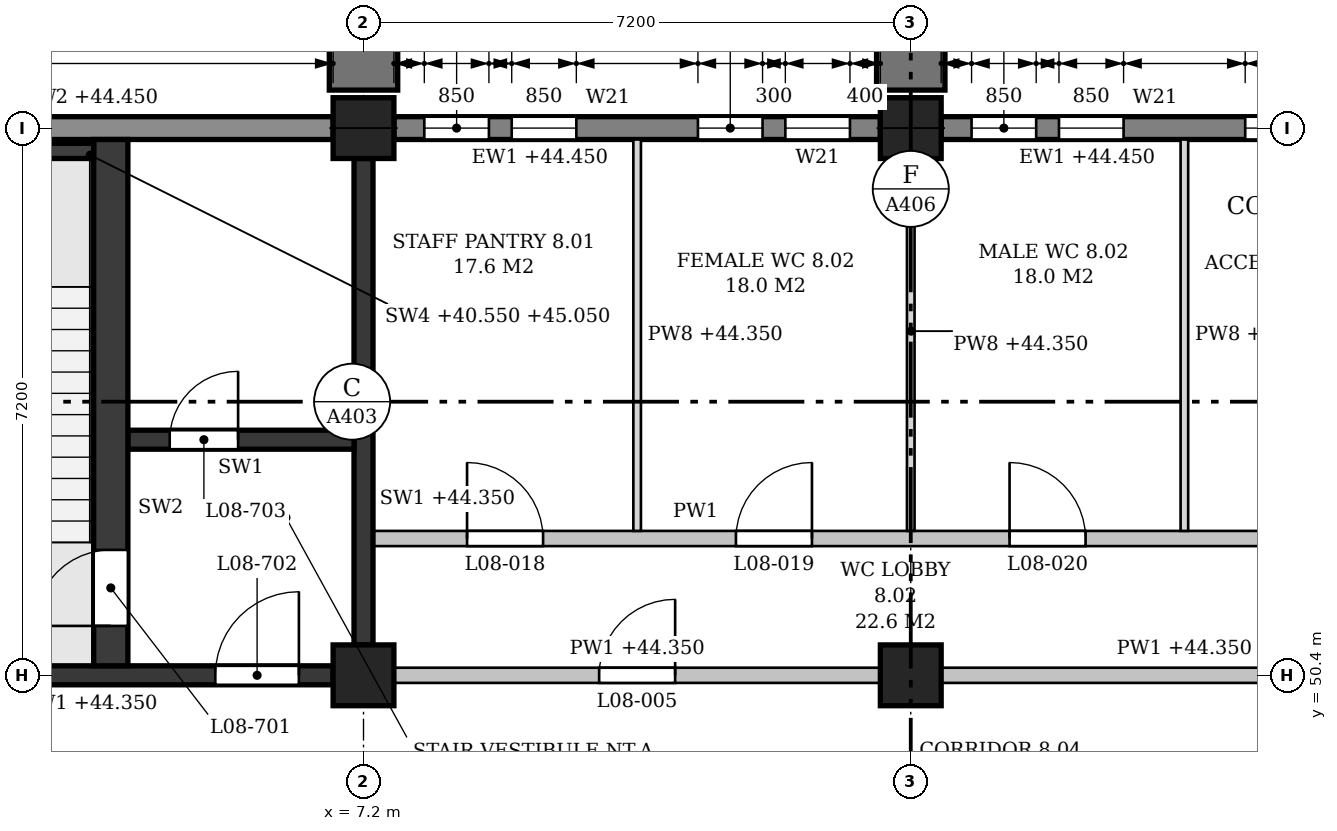
"""IFC4 building model, lengths in metres.
Left out: names, types, materials, properties, quantities, classifications, styles, units other than length and angle.
Written with IfcOpenShell. Run it as: python <this file> out.ifc"""

import sys

from ifc_helpers import new_model, si_unit, direction, frame, frame_2d, origin, origin_2d, place, context, subcontext, project, spatial, polyline, rectangle, outline, extrude, element, fill, save


model = new_model("IFC4")
c1 = context("Model", 3, precision=1e-05, world=origin(), true_north=direction((0.0, 1.0)))
c2 = subcontext(c1, "Body", "Model", "MODEL_VIEW")
j1 = project(units=[si_unit("LENGTHUNIT", "METRE"), si_unit("PLANEANGLEUNIT", "RADIAN")], contexts=[c1])
p1 = place(None, origin())
s1 = spatial("IfcSite", under=j1, at=p1, CompositionType="ELEMENT")
p2 = place(p1, origin())
s2 = spatial("IfcBuilding", under=s1, at=p2, CompositionType="ELEMENT")
p3 = place(p2, frame((0.0, 0.0, 40.8)))
s3 = spatial("IfcBuildingStorey", under=s2, at=p3, CompositionType="ELEMENT", Elevation=40.8)
for number, where, z_axis, x_axis in (
    (1, (7.2, 50.4, 0.0), (0.0, 0.0, 1.0), (1.0, 0.0, 0.0)),
    (2, (7.2, 57.6, 0.0), (0.0, 0.0, 1.0), (1.0, 0.0, 0.0)),
    (3, (14.4, 50.4, 0.0), (0.0, 0.0, 1.0), (1.0, 0.0, 0.0)),
    (4, (14.4, 57.6, 0.0), (0.0, 0.0, 1.0), (1.0, 0.0, 0.0)),
):
    element("IfcColumn", number, at=place(p3, frame(where, z_axis=z_axis, x_axis=x_axis)), inside=s3, PredefinedType="COLUMN", context=c2, shape_type="SweptSolid", body=[
        extrude(rectangle(XDim=0.8, YDim=0.8, at=origin_2d()), origin(), (0.0, 0.0, 1.0), 4.5),
    ])
p4 = place(p3, frame((21.2, 57.6, 0.0), z_axis=(0.0, 0.0, 1.0), x_axis=(-1.0, 0.0, 0.0)))
e5 = element("IfcWall", 5, at=p4, inside=s3, PredefinedType="STANDARD", context=c2, shape_type="SweptSolid", body=[
    extrude(rectangle(XDim=6.4, YDim=0.3, at=frame_2d((3.2, 0.0))), origin(), (0.0, 0.0, 1.0), 3.65),
])
p5 = place(p4, frame((0.4, 0.0, 0.9)))
e6 = element("IfcOpeningElement", 6, at=p5, cuts=e5, PredefinedType="OPENING", context=c2, shape_type="SweptSolid", body=[
    extrude(outline(polyline([(0.0, 0.0), (0.85, 0.0), (0.85, 2.25), (0.425, 2.7), (0.0, 2.25), (0.0, 0.0)])), frame((0.0, 0.16, 0.0), z_axis=(0.0, -1.0, 0.0), x_axis=(1.0, 0.0, 0.0)), (0.0, 0.0, 1.0), 0.32),
])
p6 = place(p4, frame((1.55, 0.0, 0.9)))
e7 = element("IfcOpeningElement", 7, at=p6, cuts=e5, PredefinedType="OPENING", context=c2, shape_type="SweptSolid", body=[
    extrude(outline(polyline([(0.0, 0.0), (0.85, 0.0), (0.85, 2.25), (0.425, 2.7), (0.0, 2.25), (0.0, 0.0)])), frame((0.0, 0.16, 0.0), z_axis=(0.0, -1.0, 0.0), x_axis=(1.0, 0.0, 0.0)), (0.0, 0.0, 1.0), 0.32),
])
p7 = place(p4, frame((4.0, 0.0, 0.9)))
e8 = element("IfcOpeningElement", 8, at=p7, cuts=e5, PredefinedType="OPENING", context=c2, shape_type="SweptSolid", body=[
    extrude(outline(polyline([(0.0, 0.0), (0.85, 0.0), (0.85, 2.25), (0.425, 2.7), (0.0, 2.25), (0.0, 0.0)])), frame((0.0, 0.16, 0.0), z_axis=(0.0, -1.0, 0.0), x_axis=(1.0, 0.0, 0.0)), (0.0, 0.0, 1.0), 0.32),
])
p8 = place(p4, frame((5.15, 0.0, 0.9)))
e9 = element("IfcOpeningElement", 9, at=p8, cuts=e5, PredefinedType="OPENING", context=c2, shape_type="SweptSolid", body=[
    extrude(outline(polyline([(0.0, 0.0), (0.85, 0.0), (0.85, 2.25), (0.425, 2.7), (0.0, 2.25), (0.0, 0.0)])), frame((0.0, 0.16, 0.0), z_axis=(0.0, -1.0, 0.0), x_axis=(1.0, 0.0, 0.0)), (0.0, 0.0, 1.0), 0.32),
])
p9 = place(p3, frame((14.0, 57.6, 0.0), z_axis=(0.0, 0.0, 1.0), x_axis=(-1.0, 0.0, 0.0)))
e10 = element("IfcWall", 10, at=p9, inside=s3, PredefinedType="STANDARD", context=c2, shape_type="SweptSolid", body=[
    extrude(rectangle(XDim=6.4, YDim=0.3, at=frame_2d((3.2, 0.0))), origin(), (0.0, 0.0, 1.0), 3.65),
])
p10 = place(p9, frame((0.4, 0.0, 0.9)))
e11 = element("IfcOpeningElement", 11, at=p10, cuts=e10, PredefinedType="OPENING", context=c2, shape_type="SweptSolid", body=[
    extrude(outline(polyline([(0.0, 0.0), (0.85, 0.0), (0.85, 2.25), (0.425, 2.7), (0.0, 2.25), (0.0, 0.0)])), frame((0.0, 0.16, 0.0), z_axis=(0.0, -1.0, 0.0), x_axis=(1.0, 0.0, 0.0)), (0.0, 0.0, 1.0), 0.32),
])
p11 = place(p9, frame((1.55, 0.0, 0.9)))
e12 = element("IfcOpeningElement", 12, at=p11, cuts=e10, PredefinedType="OPENING", context=c2, shape_type="SweptSolid", body=[
    extrude(outline(polyline([(0.0, 0.0), (0.85, 0.0), (0.85, 2.25), (0.425, 2.7), (0.0, 2.25), (0.0, 0.0)])), frame((0.0, 0.16, 0.0), z_axis=(0.0, -1.0, 0.0), x_axis=(1.0, 0.0, 0.0)), (0.0, 0.0, 1.0), 0.32),
])
p12 = place(p9, frame((4.0, 0.0, 0.9)))
e13 = element("IfcOpeningElement", 13, at=p12, cuts=e10, PredefinedType="OPENING", context=c2, shape_type="SweptSolid", body=[
    extrude(outline(polyline([(0.0, 0.0), (0.85, 0.0), (0.85, 2.25), (0.425, 2.7), (0.0, 2.25), (0.0, 0.0)])), frame((0.0, 0.16, 0.0), z_axis=(0.0, -1.0, 0.0), x_axis=(1.0, 0.0, 0.0)), (0.0, 0.0, 1.0), 0.32),
])
p13 = place(p9, frame((5.15, 0.0, 0.9)))
e14 = element("IfcOpeningElement", 14, at=p13, cuts=e10, PredefinedType="OPENING", context=c2, shape_type="SweptSolid", body=[
    extrude(outline(polyline([(0.0, 0.0), (0.85, 0.0), (0.85, 2.25), (0.425, 2.7), (0.0, 2.25), (0.0, 0.0)])), frame((0.0, 0.16, 0.0), z_axis=(0.0, -1.0, 0.0), x_axis=(1.0, 0.0, 0.0)), (0.0, 0.0, 1.0), 0.32),
])
p14 = place(p3, frame((6.8, 57.6, 0.0), z_axis=(0.0, 0.0, 1.0), x_axis=(-1.0, 0.0, 0.0)))
e15 = element("IfcWall", 15, at=p14, inside=s3, PredefinedType="STANDARD", context=c2, shape_type="SweptSolid", body=[
    extrude(rectangle(XDim=6.4, YDim=0.3, at=frame_2d((3.2, 0.0))), origin(), (0.0, 0.0, 1.0), 3.65),
])
p15 = place(p14, frame((4.55, 0.0, 0.9)))
e16 = element("IfcOpeningElement", 16, at=p15, cuts=e15, PredefinedType="OPENING", context=c2, shape_type="SweptSolid", body=[
    extrude(outline(polyline([(0.0, 0.0), (0.9, 0.0), (0.9, 2.25), (0.45, 2.7), (0.0, 2.25), (0.0, 0.0)])), frame((0.0, 0.16, 0.0), z_axis=(0.0, -1.0, 0.0), x_axis=(1.0, 0.0, 0.0)), (0.0, 0.0, 1.0), 0.32),
])
for number, where, z_axis, x_axis in (
    (17, (7.2, 58.1, -0.25), (0.0, 0.0, 1.0), (0.0, 1.0, 0.0)),
    (18, (14.4, 58.1, -0.25), (0.0, 0.0, 1.0), (0.0, 1.0, 0.0)),
):
    element("IfcWall", number, at=place(p3, frame(where, z_axis=z_axis, x_axis=x_axis)), inside=s3, PredefinedType="POLYGONAL", context=c2, shape_type="SweptSolid", body=[
        extrude(outline(polyline([(1.1, 0.0), (1.1, 12.325), (0.15, 13.75), (0.0, 13.75), (0.0, 0.0), (1.1, 0.0)])), frame((0.0, 0.45, 0.0), z_axis=(0.0, -1.0, 0.0), x_axis=(1.0, 0.0, 0.0)), (0.0, 0.0, 1.0), 0.9),
    ])
p16 = place(p3, frame((0.4, 50.4, 0.0), z_axis=(0.0, 0.0, 1.0), x_axis=(1.0, 0.0, 0.0)))
e19 = element("IfcWall", 19, at=p16, inside=s3, PredefinedType="SHEAR", context=c2, shape_type="SweptSolid", body=[
    extrude(rectangle(XDim=6.4, YDim=0.25, at=frame_2d((3.2, 0.0))), origin(), (0.0, 0.0, 1.0), 3.55),
])
p17 = place(p16, frame((4.85, 0.0, 0.0)))
e20 = element("IfcOpeningElement", 20, at=p17, cuts=e19, PredefinedType="OPENING", context=c2, shape_type="SweptSolid", body=[
    extrude(rectangle(XDim=1.1, YDim=2.1, at=frame_2d((0.55, 1.05))), frame((0.0, 0.135, 0.0), z_axis=(0.0, -1.0, 0.0), x_axis=(1.0, 0.0, 0.0)), (0.0, 0.0, 1.0), 0.27),
])
p18 = place(p3, frame((7.2, 50.8, 0.0), z_axis=(0.0, 0.0, 1.0), x_axis=(0.0, 1.0, 0.0)))
e21 = element("IfcWall", 21, at=p18, inside=s3, PredefinedType="SHEAR", context=c2, shape_type="SweptSolid", body=[
    extrude(rectangle(XDim=6.4, YDim=0.25, at=frame_2d((3.2, 0.0))), origin(), (0.0, 0.0, 1.0), 3.55),
])
p19 = place(p3, frame((2.25, 57.3, -0.25), z_axis=(0.0, 0.0, 1.0), x_axis=(1.0, 0.0, 0.0)))
e22 = element("IfcWall", 22, at=p19, inside=s3, PredefinedType="SHEAR", context=c2, shape_type="SweptSolid", body=[
    extrude(rectangle(XDim=1.4, YDim=0.2, at=frame_2d((0.7, 0.0))), origin(), (0.0, 0.0, 1.0), 4.5),
])
p20 = place(p3, frame((3.875, 50.525, 0.0), z_axis=(0.0, 0.0, 1.0), x_axis=(0.0, 1.0, 0.0)))
e23 = element("IfcWall", 23, at=p20, inside=s3, PredefinedType="SHEAR", context=c2, shape_type="SweptSolid", body=[
    extrude(rectangle(XDim=6.925, YDim=0.45, at=frame_2d((3.462, 0.0))), origin(), (0.0, 0.0, 1.0), 4.25),
])
p21 = place(p20, frame((0.525, 0.0, 0.0)))
e24 = element("IfcOpeningElement", 24, at=p21, cuts=e23, PredefinedType="OPENING", context=c2, shape_type="SweptSolid", body=[
    extrude(rectangle(XDim=1.0, YDim=2.1, at=frame_2d((0.5, 1.05))), frame((0.0, 0.235, 0.0), z_axis=(0.0, -1.0, 0.0), x_axis=(1.0, 0.0, 0.0)), (0.0, 0.0, 1.0), 0.47),
])
p22 = place(p3, frame((4.1, 53.5, 0.0), z_axis=(0.0, 0.0, 1.0), x_axis=(1.0, 0.0, 0.0)))
e25 = element("IfcWall", 25, at=p22, inside=s3, PredefinedType="SHEAR", context=c2, shape_type="SweptSolid", body=[
    extrude(rectangle(XDim=2.975, YDim=0.25, at=frame_2d((1.487, 0.0))), origin(), (0.0, 0.0, 1.0), 4.25),
])
p23 = place(p22, frame((0.55, 0.0, 0.0)))
e26 = element("IfcOpeningElement", 26, at=p23, cuts=e25, PredefinedType="OPENING", context=c2, shape_type="SweptSolid", body=[
    extrude(rectangle(XDim=0.9, YDim=2.1, at=frame_2d((0.45, 1.05))), frame((0.0, 0.135, 0.0), z_axis=(0.0, -1.0, 0.0), x_axis=(1.0, 0.0, 0.0)), (0.0, 0.0, 1.0), 0.27),
])
p24 = place(p3, frame((7.6, 50.4, 0.0), z_axis=(0.0, 0.0, 1.0), x_axis=(1.0, 0.0, 0.0)))
e27 = element("IfcWall", 27, at=p24, inside=s3, PredefinedType="PARTITIONING", context=c2, shape_type="SweptSolid", body=[
    extrude(rectangle(XDim=6.4, YDim=0.2, at=frame_2d((3.2, 0.0))), origin(), (0.0, 0.0, 1.0), 3.55),
])
p25 = place(p24, frame((2.7, 0.0, 0.0)))
e28 = element("IfcOpeningElement", 28, at=p25, cuts=e27, PredefinedType="OPENING", context=c2, shape_type="SweptSolid", body=[
    extrude(rectangle(XDim=1.0, YDim=2.1, at=frame_2d((0.5, 1.05))), frame((0.0, 0.11, 0.0), z_axis=(0.0, -1.0, 0.0), x_axis=(1.0, 0.0, 0.0)), (0.0, 0.0, 1.0), 0.22),
])
p26 = place(p3, frame((14.8, 50.4, 0.0), z_axis=(0.0, 0.0, 1.0), x_axis=(1.0, 0.0, 0.0)))
e29 = element("IfcWall", 29, at=p26, inside=s3, PredefinedType="PARTITIONING", context=c2, shape_type="SweptSolid", body=[
    extrude(rectangle(XDim=6.4, YDim=0.2, at=frame_2d((3.2, 0.0))), origin(), (0.0, 0.0, 1.0), 3.55),
])
p27 = place(p26, frame((4.3, 0.0, 0.0)))
e30 = element("IfcOpeningElement", 30, at=p27, cuts=e29, PredefinedType="OPENING", context=c2, shape_type="SweptSolid", body=[
    extrude(rectangle(XDim=1.0, YDim=2.1, at=frame_2d((0.5, 1.05))), frame((0.0, 0.11, 0.0), z_axis=(0.0, -1.0, 0.0), x_axis=(1.0, 0.0, 0.0)), (0.0, 0.0, 1.0), 0.22),
])
p28 = place(p3, frame((7.325, 52.2, 0.0), z_axis=(0.0, 0.0, 1.0), x_axis=(1.0, 0.0, 0.0)))
e31 = element("IfcWall", 31, at=p28, inside=s3, PredefinedType="PARTITIONING", context=c2, shape_type="SweptSolid", body=[
    extrude(outline(polyline([(0.0, 0.0), (14.15, 0.0), (14.15, 3.55), (14.05, 3.55), (14.05, 4.25), (7.3, 4.25), (7.3, 3.55), (6.85, 3.55), (6.85, 4.25), (0.1, 4.25), (0.1, 3.55), (0.0, 3.55), (0.0, 0.0)])), frame((0.0, 0.1, 0.0), z_axis=(0.0, -1.0, 0.0), x_axis=(1.0, 0.0, 0.0)), (0.0, 0.0, 1.0), 0.2),
])
p29 = place(p28, frame((1.238, 0.0, 0.0)))
e32 = element("IfcOpeningElement", 32, at=p29, cuts=e31, PredefinedType="OPENING", context=c2, shape_type="SweptSolid", body=[
    extrude(rectangle(XDim=1.0, YDim=2.1, at=frame_2d((0.5, 1.05))), frame((0.0, 0.11, 0.0), z_axis=(0.0, -1.0, 0.0), x_axis=(1.0, 0.0, 0.0)), (0.0, 0.0, 1.0), 0.22),
])
p30 = place(p28, frame((4.775, 0.0, 0.0)))
e33 = element("IfcOpeningElement", 33, at=p30, cuts=e31, PredefinedType="OPENING", context=c2, shape_type="SweptSolid", body=[
    extrude(rectangle(XDim=1.0, YDim=2.1, at=frame_2d((0.5, 1.05))), frame((0.0, 0.11, 0.0), z_axis=(0.0, -1.0, 0.0), x_axis=(1.0, 0.0, 0.0)), (0.0, 0.0, 1.0), 0.22),
])
p31 = place(p28, frame((8.375, 0.0, 0.0)))
e34 = element("IfcOpeningElement", 34, at=p31, cuts=e31, PredefinedType="OPENING", context=c2, shape_type="SweptSolid", body=[
    extrude(rectangle(XDim=1.0, YDim=2.1, at=frame_2d((0.5, 1.05))), frame((0.0, 0.11, 0.0), z_axis=(0.0, -1.0, 0.0), x_axis=(1.0, 0.0, 0.0)), (0.0, 0.0, 1.0), 0.22),
])
p32 = place(p28, frame((11.913, 0.0, 0.0)))
e35 = element("IfcOpeningElement", 35, at=p32, cuts=e31, PredefinedType="OPENING", context=c2, shape_type="SweptSolid", body=[
    extrude(rectangle(XDim=1.0, YDim=2.1, at=frame_2d((0.5, 1.05))), frame((0.0, 0.11, 0.0), z_axis=(0.0, -1.0, 0.0), x_axis=(1.0, 0.0, 0.0)), (0.0, 0.0, 1.0), 0.22),
])
p33 = place(p3, frame((10.8, 52.3, 0.0), z_axis=(0.0, 0.0, 1.0), x_axis=(0.0, 1.0, 0.0)))
e36 = element("IfcWall", 36, at=p33, inside=s3, PredefinedType="PARTITIONING", context=c2, shape_type="SweptSolid", body=[
    extrude(rectangle(XDim=5.15, YDim=0.1, at=frame_2d((2.575, 0.0))), origin(), (0.0, 0.0, 1.0), 3.55),
])
p34 = place(p3, frame((14.4, 52.3, 0.0), z_axis=(0.0, 0.0, 1.0), x_axis=(0.0, 1.0, 0.0)))
e37 = element("IfcWall", 37, at=p34, inside=s3, PredefinedType="PARTITIONING", context=c2, shape_type="SweptSolid", body=[
    extrude(rectangle(XDim=4.9, YDim=0.1, at=frame_2d((2.45, 0.0))), origin(), (0.0, 0.0, 1.0), 3.55),
])
p35 = place(p3, frame((18.0, 52.3, 0.0), z_axis=(0.0, 0.0, 1.0), x_axis=(0.0, 1.0, 0.0)))
e38 = element("IfcWall", 38, at=p35, inside=s3, PredefinedType="PARTITIONING", context=c2, shape_type="SweptSolid", body=[
    extrude(rectangle(XDim=5.15, YDim=0.1, at=frame_2d((2.575, 0.0))), origin(), (0.0, 0.0, 1.0), 3.55),
])
p36 = place(p6, origin())
e39 = element("IfcWindow", 39, at=p36, inside=s3, PartitioningType="SINGLE_PANEL", PredefinedType="WINDOW", context=c2, shape_type="SweptSolid", body=[
    extrude(outline(polyline([(0.0, 0.0), (0.85, 0.0), (0.85, 2.25), (0.425, 2.7), (0.0, 2.25), (0.0, 0.0)])), frame((0.0, 0.03, 0.0), z_axis=(0.0, -1.0, 0.0), x_axis=(1.0, 0.0, 0.0)), (0.0, 0.0, 1.0), 0.06),
])
fill(e7, e39)
p37 = place(p7, origin())
e40 = element("IfcWindow", 40, at=p37, inside=s3, PartitioningType="SINGLE_PANEL", PredefinedType="WINDOW", context=c2, shape_type="SweptSolid", body=[
    extrude(outline(polyline([(0.0, 0.0), (0.85, 0.0), (0.85, 2.25), (0.425, 2.7), (0.0, 2.25), (0.0, 0.0)])), frame((0.0, 0.03, 0.0), z_axis=(0.0, -1.0, 0.0), x_axis=(1.0, 0.0, 0.0)), (0.0, 0.0, 1.0), 0.06),
])
fill(e8, e40)
p38 = place(p8, origin())
e41 = element("IfcWindow", 41, at=p38, inside=s3, PartitioningType="SINGLE_PANEL", PredefinedType="WINDOW", context=c2, shape_type="SweptSolid", body=[
    extrude(outline(polyline([(0.0, 0.0), (0.85, 0.0), (0.85, 2.25), (0.425, 2.7), (0.0, 2.25), (0.0, 0.0)])), frame((0.0, 0.03, 0.0), z_axis=(0.0, -1.0, 0.0), x_axis=(1.0, 0.0, 0.0)), (0.0, 0.0, 1.0), 0.06),
])
fill(e9, e41)
p39 = place(p10, origin())
e42 = element("IfcWindow", 42, at=p39, inside=s3, PartitioningType="SINGLE_PANEL", PredefinedType="WINDOW", context=c2, shape_type="SweptSolid", body=[
    extrude(outline(polyline([(0.0, 0.0), (0.85, 0.0), (0.85, 2.25), (0.425, 2.7), (0.0, 2.25), (0.0, 0.0)])), frame((0.0, 0.03, 0.0), z_axis=(0.0, -1.0, 0.0), x_axis=(1.0, 0.0, 0.0)), (0.0, 0.0, 1.0), 0.06),
])
fill(e11, e42)
p40 = place(p11, origin())
e43 = element("IfcWindow", 43, at=p40, inside=s3, PartitioningType="SINGLE_PANEL", PredefinedType="WINDOW", context=c2, shape_type="SweptSolid", body=[
    extrude(outline(polyline([(0.0, 0.0), (0.85, 0.0), (0.85, 2.25), (0.425, 2.7), (0.0, 2.25), (0.0, 0.0)])), frame((0.0, 0.03, 0.0), z_axis=(0.0, -1.0, 0.0), x_axis=(1.0, 0.0, 0.0)), (0.0, 0.0, 1.0), 0.06),
])
fill(e12, e43)
p41 = place(p12, origin())
e44 = element("IfcWindow", 44, at=p41, inside=s3, PartitioningType="SINGLE_PANEL", PredefinedType="WINDOW", context=c2, shape_type="SweptSolid", body=[
    extrude(outline(polyline([(0.0, 0.0), (0.85, 0.0), (0.85, 2.25), (0.425, 2.7), (0.0, 2.25), (0.0, 0.0)])), frame((0.0, 0.03, 0.0), z_axis=(0.0, -1.0, 0.0), x_axis=(1.0, 0.0, 0.0)), (0.0, 0.0, 1.0), 0.06),
])
fill(e13, e44)
p42 = place(p13, origin())
e45 = element("IfcWindow", 45, at=p42, inside=s3, PartitioningType="SINGLE_PANEL", PredefinedType="WINDOW", context=c2, shape_type="SweptSolid", body=[
    extrude(outline(polyline([(0.0, 0.0), (0.85, 0.0), (0.85, 2.25), (0.425, 2.7), (0.0, 2.25), (0.0, 0.0)])), frame((0.0, 0.03, 0.0), z_axis=(0.0, -1.0, 0.0), x_axis=(1.0, 0.0, 0.0)), (0.0, 0.0, 1.0), 0.06),
])
fill(e14, e45)
p43 = place(p21, origin())
e46 = element("IfcDoor", 46, at=p43, inside=s3, OperationType="SINGLE_SWING_LEFT", PredefinedType="DOOR", context=c2, shape_type="SweptSolid", body=[
    extrude(rectangle(XDim=1.0, YDim=2.1, at=frame_2d((0.5, 1.05))), frame((0.0, 0.025, 0.0), z_axis=(0.0, -1.0, 0.0), x_axis=(1.0, 0.0, 0.0)), (0.0, 0.0, 1.0), 0.05),
])
fill(e24, e46)
p44 = place(p17, origin())
e47 = element("IfcDoor", 47, at=p44, inside=s3, OperationType="SINGLE_SWING_RIGHT", PredefinedType="DOOR", context=c2, shape_type="SweptSolid", body=[
    extrude(rectangle(XDim=1.1, YDim=2.1, at=frame_2d((0.55, 1.05))), frame((0.0, 0.025, 0.0), z_axis=(0.0, -1.0, 0.0), x_axis=(1.0, 0.0, 0.0)), (0.0, 0.0, 1.0), 0.05),
])
fill(e20, e47)
p45 = place(p23, origin())
e48 = element("IfcDoor", 48, at=p45, inside=s3, OperationType="SINGLE_SWING_RIGHT", PredefinedType="DOOR", context=c2, shape_type="SweptSolid", body=[
    extrude(rectangle(XDim=0.9, YDim=2.1, at=frame_2d((0.45, 1.05))), frame((0.0, 0.025, 0.0), z_axis=(0.0, -1.0, 0.0), x_axis=(1.0, 0.0, 0.0)), (0.0, 0.0, 1.0), 0.05),
])
fill(e26, e48)
p46 = place(p25, origin())
e49 = element("IfcDoor", 49, at=p46, inside=s3, OperationType="SINGLE_SWING_RIGHT", PredefinedType="DOOR", context=c2, shape_type="SweptSolid", body=[
    extrude(rectangle(XDim=1.0, YDim=2.1, at=frame_2d((0.5, 1.05))), frame((0.0, 0.025, 0.0), z_axis=(0.0, -1.0, 0.0), x_axis=(1.0, 0.0, 0.0)), (0.0, 0.0, 1.0), 0.05),
])
fill(e28, e49)
p47 = place(p29, origin())
e50 = element("IfcDoor", 50, at=p47, inside=s3, OperationType="SINGLE_SWING_LEFT", PredefinedType="DOOR", context=c2, shape_type="SweptSolid", body=[
    extrude(rectangle(XDim=1.0, YDim=2.1, at=frame_2d((0.5, 1.05))), frame((0.0, 0.025, 0.0), z_axis=(0.0, -1.0, 0.0), x_axis=(1.0, 0.0, 0.0)), (0.0, 0.0, 1.0), 0.05),
])
fill(e32, e50)
p48 = place(p30, origin())
e51 = element("IfcDoor", 51, at=p48, inside=s3, OperationType="SINGLE_SWING_RIGHT", PredefinedType="DOOR", context=c2, shape_type="SweptSolid", body=[
    extrude(rectangle(XDim=1.0, YDim=2.1, at=frame_2d((0.5, 1.05))), frame((0.0, 0.025, 0.0), z_axis=(0.0, -1.0, 0.0), x_axis=(1.0, 0.0, 0.0)), (0.0, 0.0, 1.0), 0.05),
])
fill(e33, e51)
p49 = place(p31, origin())
e52 = element("IfcDoor", 52, at=p49, inside=s3, OperationType="SINGLE_SWING_LEFT", PredefinedType="DOOR", context=c2, shape_type="SweptSolid", body=[
    extrude(rectangle(XDim=1.0, YDim=2.1, at=frame_2d((0.5, 1.05))), frame((0.0, 0.025, 0.0), z_axis=(0.0, -1.0, 0.0), x_axis=(1.0, 0.0, 0.0)), (0.0, 0.0, 1.0), 0.05),
])
fill(e34, e52)
save(model, sys.argv[1])
